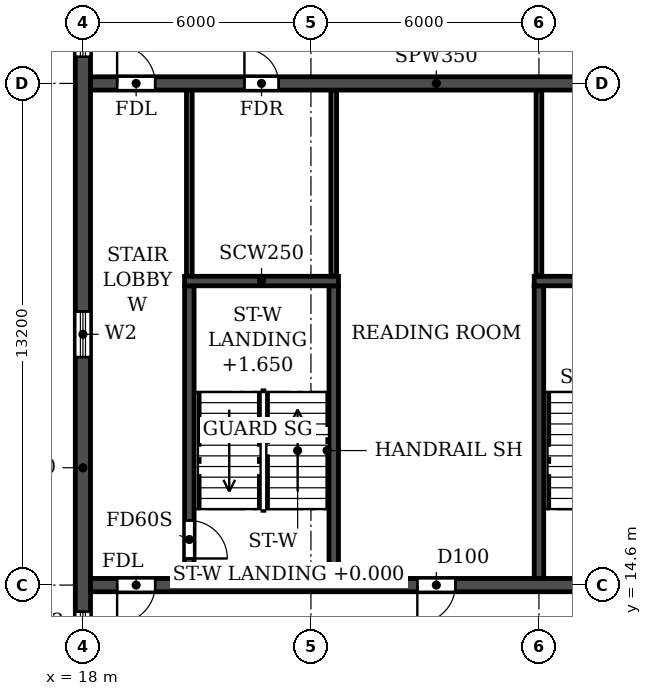
"""IFC4 building model, lengths in metres.
Left out: names, types, materials, properties, quantities, classifications, styles, units other than length and angle.
Written with IfcOpenShell. Run it as: python <this file> out.ifc"""

import sys

from ifc_helpers import new_model, si_unit, direction, frame, frame_2d, origin, place, context, subcontext, project, spatial, rectangle, extrude, element, fill, save


model = new_model("IFC4")
c1 = context("Model", 3, precision=1e-05, world=origin(), true_north=direction((0.0, 1.0)))
c2 = subcontext(c1, "Body", "Model", "MODEL_VIEW")
j1 = project(units=[si_unit("LENGTHUNIT", "METRE"), si_unit("PLANEANGLEUNIT", "RADIAN")], contexts=[c1])
p1 = place(None, origin())
s1 = spatial("IfcSite", under=j1, at=p1, CompositionType="ELEMENT")
p2 = place(p1, origin())
s2 = spatial("IfcBuilding", under=s1, at=p2, CompositionType="ELEMENT")
p3 = place(p2, frame((0.0, 0.0, 231.3)))
s3 = spatial("IfcBuildingStorey", under=s2, at=p3, CompositionType="ELEMENT", Elevation=231.3)
p4 = place(p3, frame((18.0, 4.683, 0.0), z_axis=(0.0, 0.0, 1.0), x_axis=(0.0, 1.0, 0.0)))
e1 = element("IfcWall", 1, at=p4, inside=s3, PredefinedType="SHEAR", context=c2, shape_type="SweptSolid", body=[
    extrude(rectangle(XDim=31.834, YDim=0.4, at=frame_2d((15.917, 0.0))), origin(), (0.0, 0.0, 1.0), 3.08),
])
p5 = place(p4, frame((23.817, 0.0, 0.9)))
e2 = element("IfcOpeningElement", 2, at=p5, cuts=e1, PredefinedType="OPENING", context=c2, shape_type="SweptSolid", body=[
    extrude(rectangle(XDim=1.2, YDim=1.5, at=frame_2d((0.6, 0.75))), frame((0.0, 0.21, 0.0), z_axis=(0.0, -1.0, 0.0), x_axis=(1.0, 0.0, 0.0)), (0.0, 0.0, 1.0), 0.42),
])
p6 = place(p4, frame((8.017, 0.0, 0.9)))
e3 = element("IfcOpeningElement", 3, at=p6, cuts=e1, PredefinedType="OPENING", context=c2, shape_type="SweptSolid", body=[
    extrude(rectangle(XDim=1.2, YDim=1.5, at=frame_2d((0.6, 0.75))), frame((0.0, 0.21, 0.0), z_axis=(0.0, -1.0, 0.0), x_axis=(1.0, 0.0, 0.0)), (0.0, 0.0, 1.0), 0.42),
])
p7 = place(p4, frame((27.694, 0.0, 0.6)))
e4 = element("IfcOpeningElement", 4, at=p7, cuts=e1, PredefinedType="OPENING", context=c2, shape_type="SweptSolid", body=[
    extrude(rectangle(XDim=2.2, YDim=1.8, at=frame_2d((1.1, 0.9))), frame((0.0, 0.21, 0.0), z_axis=(0.0, -1.0, 0.0), x_axis=(1.0, 0.0, 0.0)), (0.0, 0.0, 1.0), 0.42),
])
p8 = place(p4, frame((2.541, 0.0, 0.6)))
e5 = element("IfcOpeningElement", 5, at=p8, cuts=e1, PredefinedType="OPENING", context=c2, shape_type="SweptSolid", body=[
    extrude(rectangle(XDim=2.2, YDim=1.8, at=frame_2d((1.1, 0.9))), frame((0.0, 0.21, 0.0), z_axis=(0.0, -1.0, 0.0), x_axis=(1.0, 0.0, 0.0)), (0.0, 0.0, 1.0), 0.42),
])
p9 = place(p4, frame((15.917, 0.0, 0.9)))
e6 = element("IfcOpeningElement", 6, at=p9, cuts=e1, PredefinedType="OPENING", context=c2, shape_type="SweptSolid", body=[
    extrude(rectangle(XDim=1.2, YDim=1.5, at=frame_2d((0.6, 0.75))), frame((0.0, 0.21, 0.0), z_axis=(0.0, -1.0, 0.0), x_axis=(1.0, 0.0, 0.0)), (0.0, 0.0, 1.0), 0.42),
])
p10 = place(p3, frame((18.2, 14.6, 0.0), z_axis=(0.0, 0.0, 1.0), x_axis=(1.0, 0.0, 0.0)))
e7 = element("IfcWall", 7, at=p10, inside=s3, PredefinedType="SOLIDWALL", context=c2, shape_type="SweptSolid", body=[
    extrude(rectangle(XDim=65.6, YDim=0.35, at=frame_2d((32.8, 0.0))), origin(), (0.0, 0.0, 1.0), 3.08),
])
p11 = place(p10, frame((0.7, 0.0, 0.0)))
e8 = element("IfcOpeningElement", 8, at=p11, cuts=e7, PredefinedType="OPENING", context=c2, shape_type="SweptSolid", body=[
    extrude(rectangle(XDim=1.0, YDim=2.1, at=frame_2d((0.5, 1.05))), frame((0.0, 0.185, 0.0), z_axis=(0.0, -1.0, 0.0), x_axis=(1.0, 0.0, 0.0)), (0.0, 0.0, 1.0), 0.37),
])
p12 = place(p10, frame((8.6, 0.0, 0.0)))
e9 = element("IfcOpeningElement", 9, at=p12, cuts=e7, PredefinedType="OPENING", context=c2, shape_type="SweptSolid", body=[
    extrude(rectangle(XDim=1.0, YDim=2.1, at=frame_2d((0.5, 1.05))), frame((0.0, 0.185, 0.0), z_axis=(0.0, -1.0, 0.0), x_axis=(1.0, 0.0, 0.0)), (0.0, 0.0, 1.0), 0.37),
])
p13 = place(p10, frame((13.2, 0.0, 0.0)))
e10 = element("IfcOpeningElement", 10, at=p13, cuts=e7, PredefinedType="OPENING", context=c2, shape_type="SweptSolid", body=[
    extrude(rectangle(XDim=1.0, YDim=2.1, at=frame_2d((0.5, 1.05))), frame((0.0, 0.185, 0.0), z_axis=(0.0, -1.0, 0.0), x_axis=(1.0, 0.0, 0.0)), (0.0, 0.0, 1.0), 0.37),
])
p14 = place(p10, frame((24.5, 0.0, 0.0)))
e11 = element("IfcOpeningElement", 11, at=p14, cuts=e7, PredefinedType="OPENING", context=c2, shape_type="SweptSolid", body=[
    extrude(rectangle(XDim=1.0, YDim=2.1, at=frame_2d((0.5, 1.05))), frame((0.0, 0.185, 0.0), z_axis=(0.0, -1.0, 0.0), x_axis=(1.0, 0.0, 0.0)), (0.0, 0.0, 1.0), 0.37),
])
p15 = place(p10, frame((28.4, 0.0, 0.0)))
e12 = element("IfcOpeningElement", 12, at=p15, cuts=e7, PredefinedType="OPENING", context=c2, shape_type="SweptSolid", body=[
    extrude(rectangle(XDim=1.0, YDim=2.1, at=frame_2d((0.5, 1.05))), frame((0.0, 0.185, 0.0), z_axis=(0.0, -1.0, 0.0), x_axis=(1.0, 0.0, 0.0)), (0.0, 0.0, 1.0), 0.37),
])
p16 = place(p10, frame((32.3, 0.0, 0.0)))
e13 = element("IfcOpeningElement", 13, at=p16, cuts=e7, PredefinedType="OPENING", context=c2, shape_type="SweptSolid", body=[
    extrude(rectangle(XDim=1.0, YDim=2.1, at=frame_2d((0.5, 1.05))), frame((0.0, 0.185, 0.0), z_axis=(0.0, -1.0, 0.0), x_axis=(1.0, 0.0, 0.0)), (0.0, 0.0, 1.0), 0.37),
])
p17 = place(p10, frame((36.2, 0.0, 0.0)))
e14 = element("IfcOpeningElement", 14, at=p17, cuts=e7, PredefinedType="OPENING", context=c2, shape_type="SweptSolid", body=[
    extrude(rectangle(XDim=1.0, YDim=2.1, at=frame_2d((0.5, 1.05))), frame((0.0, 0.185, 0.0), z_axis=(0.0, -1.0, 0.0), x_axis=(1.0, 0.0, 0.0)), (0.0, 0.0, 1.0), 0.37),
])
p18 = place(p10, frame((40.1, 0.0, 0.0)))
e15 = element("IfcOpeningElement", 15, at=p18, cuts=e7, PredefinedType="OPENING", context=c2, shape_type="SweptSolid", body=[
    extrude(rectangle(XDim=1.0, YDim=2.1, at=frame_2d((0.5, 1.05))), frame((0.0, 0.185, 0.0), z_axis=(0.0, -1.0, 0.0), x_axis=(1.0, 0.0, 0.0)), (0.0, 0.0, 1.0), 0.37),
])
p19 = place(p10, frame((51.4, 0.0, 0.0)))
e16 = element("IfcOpeningElement", 16, at=p19, cuts=e7, PredefinedType="OPENING", context=c2, shape_type="SweptSolid", body=[
    extrude(rectangle(XDim=1.0, YDim=2.1, at=frame_2d((0.5, 1.05))), frame((0.0, 0.185, 0.0), z_axis=(0.0, -1.0, 0.0), x_axis=(1.0, 0.0, 0.0)), (0.0, 0.0, 1.0), 0.37),
])
p20 = place(p10, frame((56.0, 0.0, 0.0)))
e17 = element("IfcOpeningElement", 17, at=p20, cuts=e7, PredefinedType="OPENING", context=c2, shape_type="SweptSolid", body=[
    extrude(rectangle(XDim=1.0, YDim=2.1, at=frame_2d((0.5, 1.05))), frame((0.0, 0.185, 0.0), z_axis=(0.0, -1.0, 0.0), x_axis=(1.0, 0.0, 0.0)), (0.0, 0.0, 1.0), 0.37),
])
p21 = place(p10, frame((63.9, 0.0, 0.0)))
e18 = element("IfcOpeningElement", 18, at=p21, cuts=e7, PredefinedType="OPENING", context=c2, shape_type="SweptSolid", body=[
    extrude(rectangle(XDim=1.0, YDim=2.1, at=frame_2d((0.5, 1.05))), frame((0.0, 0.185, 0.0), z_axis=(0.0, -1.0, 0.0), x_axis=(1.0, 0.0, 0.0)), (0.0, 0.0, 1.0), 0.37),
])
p22 = place(p3, frame((18.2, 27.8, 0.0), z_axis=(0.0, 0.0, 1.0), x_axis=(1.0, 0.0, 0.0)))
e19 = element("IfcWall", 19, at=p22, inside=s3, PredefinedType="SOLIDWALL", context=c2, shape_type="SweptSolid", body=[
    extrude(rectangle(XDim=65.6, YDim=0.35, at=frame_2d((32.8, 0.0))), origin(), (0.0, 0.0, 1.0), 3.08),
])
p23 = place(p22, frame((0.7, 0.0, 0.0)))
e20 = element("IfcOpeningElement", 20, at=p23, cuts=e19, PredefinedType="OPENING", context=c2, shape_type="SweptSolid", body=[
    extrude(rectangle(XDim=1.0, YDim=2.1, at=frame_2d((0.5, 1.05))), frame((0.0, 0.185, 0.0), z_axis=(0.0, -1.0, 0.0), x_axis=(1.0, 0.0, 0.0)), (0.0, 0.0, 1.0), 0.37),
])
p24 = place(p22, frame((4.05, 0.0, 0.0)))
e21 = element("IfcOpeningElement", 21, at=p24, cuts=e19, PredefinedType="OPENING", context=c2, shape_type="SweptSolid", body=[
    extrude(rectangle(XDim=0.9, YDim=2.1, at=frame_2d((0.45, 1.05))), frame((0.0, 0.185, 0.0), z_axis=(0.0, -1.0, 0.0), x_axis=(1.0, 0.0, 0.0)), (0.0, 0.0, 1.0), 0.37),
])
p25 = place(p22, frame((13.25, 0.0, 0.0)))
e22 = element("IfcOpeningElement", 22, at=p25, cuts=e19, PredefinedType="OPENING", context=c2, shape_type="SweptSolid", body=[
    extrude(rectangle(XDim=0.9, YDim=2.1, at=frame_2d((0.45, 1.05))), frame((0.0, 0.185, 0.0), z_axis=(0.0, -1.0, 0.0), x_axis=(1.0, 0.0, 0.0)), (0.0, 0.0, 1.0), 0.37),
])
p26 = place(p22, frame((16.4, 0.0, 0.0)))
e23 = element("IfcOpeningElement", 23, at=p26, cuts=e19, PredefinedType="OPENING", context=c2, shape_type="SweptSolid", body=[
    extrude(rectangle(XDim=1.0, YDim=2.1, at=frame_2d((0.5, 1.05))), frame((0.0, 0.185, 0.0), z_axis=(0.0, -1.0, 0.0), x_axis=(1.0, 0.0, 0.0)), (0.0, 0.0, 1.0), 0.37),
])
p27 = place(p22, frame((21.6, 0.0, 0.0)))
e24 = element("IfcOpeningElement", 24, at=p27, cuts=e19, PredefinedType="OPENING", context=c2, shape_type="SweptSolid", body=[
    extrude(rectangle(XDim=1.0, YDim=2.1, at=frame_2d((0.5, 1.05))), frame((0.0, 0.185, 0.0), z_axis=(0.0, -1.0, 0.0), x_axis=(1.0, 0.0, 0.0)), (0.0, 0.0, 1.0), 0.37),
])
p28 = place(p22, frame((29.4, 0.0, 0.0)))
e25 = element("IfcOpeningElement", 25, at=p28, cuts=e19, PredefinedType="OPENING", context=c2, shape_type="SweptSolid", body=[
    extrude(rectangle(XDim=1.0, YDim=2.1, at=frame_2d((0.5, 1.05))), frame((0.0, 0.185, 0.0), z_axis=(0.0, -1.0, 0.0), x_axis=(1.0, 0.0, 0.0)), (0.0, 0.0, 1.0), 0.37),
])
p29 = place(p22, frame((32.3, 0.0, 0.0)))
e26 = element("IfcOpeningElement", 26, at=p29, cuts=e19, PredefinedType="OPENING", context=c2, shape_type="SweptSolid", body=[
    extrude(rectangle(XDim=1.0, YDim=2.1, at=frame_2d((0.5, 1.05))), frame((0.0, 0.185, 0.0), z_axis=(0.0, -1.0, 0.0), x_axis=(1.0, 0.0, 0.0)), (0.0, 0.0, 1.0), 0.37),
])
p30 = place(p22, frame((35.2, 0.0, 0.0)))
e27 = element("IfcOpeningElement", 27, at=p30, cuts=e19, PredefinedType="OPENING", context=c2, shape_type="SweptSolid", body=[
    extrude(rectangle(XDim=1.0, YDim=2.1, at=frame_2d((0.5, 1.05))), frame((0.0, 0.185, 0.0), z_axis=(0.0, -1.0, 0.0), x_axis=(1.0, 0.0, 0.0)), (0.0, 0.0, 1.0), 0.37),
])
p31 = place(p22, frame((37.8, 0.0, 0.0)))
e28 = element("IfcOpeningElement", 28, at=p31, cuts=e19, PredefinedType="OPENING", context=c2, shape_type="SweptSolid", body=[
    extrude(rectangle(XDim=1.0, YDim=2.1, at=frame_2d((0.5, 1.05))), frame((0.0, 0.185, 0.0), z_axis=(0.0, -1.0, 0.0), x_axis=(1.0, 0.0, 0.0)), (0.0, 0.0, 1.0), 0.37),
])
p32 = place(p22, frame((40.4, 0.0, 0.0)))
e29 = element("IfcOpeningElement", 29, at=p32, cuts=e19, PredefinedType="OPENING", context=c2, shape_type="SweptSolid", body=[
    extrude(rectangle(XDim=1.0, YDim=2.1, at=frame_2d((0.5, 1.05))), frame((0.0, 0.185, 0.0), z_axis=(0.0, -1.0, 0.0), x_axis=(1.0, 0.0, 0.0)), (0.0, 0.0, 1.0), 0.37),
])
p33 = place(p22, frame((43.0, 0.0, 0.0)))
e30 = element("IfcOpeningElement", 30, at=p33, cuts=e19, PredefinedType="OPENING", context=c2, shape_type="SweptSolid", body=[
    extrude(rectangle(XDim=1.0, YDim=2.1, at=frame_2d((0.5, 1.05))), frame((0.0, 0.185, 0.0), z_axis=(0.0, -1.0, 0.0), x_axis=(1.0, 0.0, 0.0)), (0.0, 0.0, 1.0), 0.37),
])
p34 = place(p22, frame((45.6, 0.0, 0.0)))
e31 = element("IfcOpeningElement", 31, at=p34, cuts=e19, PredefinedType="OPENING", context=c2, shape_type="SweptSolid", body=[
    extrude(rectangle(XDim=1.0, YDim=2.1, at=frame_2d((0.5, 1.05))), frame((0.0, 0.185, 0.0), z_axis=(0.0, -1.0, 0.0), x_axis=(1.0, 0.0, 0.0)), (0.0, 0.0, 1.0), 0.37),
])
p35 = place(p22, frame((48.2, 0.0, 0.0)))
e32 = element("IfcOpeningElement", 32, at=p35, cuts=e19, PredefinedType="OPENING", context=c2, shape_type="SweptSolid", body=[
    extrude(rectangle(XDim=1.0, YDim=2.1, at=frame_2d((0.5, 1.05))), frame((0.0, 0.185, 0.0), z_axis=(0.0, -1.0, 0.0), x_axis=(1.0, 0.0, 0.0)), (0.0, 0.0, 1.0), 0.37),
])
p36 = place(p22, frame((51.45, 0.0, 0.0)))
e33 = element("IfcOpeningElement", 33, at=p36, cuts=e19, PredefinedType="OPENING", context=c2, shape_type="SweptSolid", body=[
    extrude(rectangle(XDim=0.9, YDim=2.1, at=frame_2d((0.45, 1.05))), frame((0.0, 0.185, 0.0), z_axis=(0.0, -1.0, 0.0), x_axis=(1.0, 0.0, 0.0)), (0.0, 0.0, 1.0), 0.37),
])
p37 = place(p22, frame((60.65, 0.0, 0.0)))
e34 = element("IfcOpeningElement", 34, at=p37, cuts=e19, PredefinedType="OPENING", context=c2, shape_type="SweptSolid", body=[
    extrude(rectangle(XDim=0.9, YDim=2.1, at=frame_2d((0.45, 1.05))), frame((0.0, 0.185, 0.0), z_axis=(0.0, -1.0, 0.0), x_axis=(1.0, 0.0, 0.0)), (0.0, 0.0, 1.0), 0.37),
])
p38 = place(p22, frame((63.9, 0.0, 0.0)))
e35 = element("IfcOpeningElement", 35, at=p38, cuts=e19, PredefinedType="OPENING", context=c2, shape_type="SweptSolid", body=[
    extrude(rectangle(XDim=1.0, YDim=2.1, at=frame_2d((0.5, 1.05))), frame((0.0, 0.185, 0.0), z_axis=(0.0, -1.0, 0.0), x_axis=(1.0, 0.0, 0.0)), (0.0, 0.0, 1.0), 0.37),
])
p39 = place(p3, frame((30.0, 14.775, 0.0), z_axis=(0.0, 0.0, 1.0), x_axis=(0.0, 1.0, 0.0)))
e36 = element("IfcWall", 36, at=p39, inside=s3, PredefinedType="SOLIDWALL", context=c2, shape_type="SweptSolid", body=[
    extrude(rectangle(XDim=7.7, YDim=0.25, at=frame_2d((3.85, 0.0))), origin(), (0.0, 0.0, 1.0), 3.08),
])
p40 = place(p3, frame((29.875, 22.6, 0.0), z_axis=(0.0, 0.0, 1.0), x_axis=(1.0, 0.0, 0.0)))
e37 = element("IfcWall", 37, at=p40, inside=s3, PredefinedType="SOLIDWALL", context=c2, shape_type="SweptSolid", body=[
    extrude(rectangle(XDim=4.05, YDim=0.25, at=frame_2d((2.025, 0.0))), origin(), (0.0, 0.0, 1.0), 3.08),
])
p41 = place(p3, frame((20.8, 14.775, 0.0), z_axis=(0.0, 0.0, 1.0), x_axis=(0.0, 1.0, 0.0)))
e38 = element("IfcWall", 38, at=p41, inside=s3, PredefinedType="SOLIDWALL", context=c2, shape_type="SweptSolid", body=[
    extrude(rectangle(XDim=7.7, YDim=0.25, at=frame_2d((3.85, 0.0))), origin(), (0.0, 0.0, 1.0), 3.08),
])
p42 = place(p41, frame((0.525, 0.0, 0.0)))
e39 = element("IfcOpeningElement", 39, at=p42, cuts=e38, PredefinedType="OPENING", context=c2, shape_type="SweptSolid", body=[
    extrude(rectangle(XDim=1.0, YDim=2.1, at=frame_2d((0.5, 1.05))), frame((0.0, 0.135, 0.0), z_axis=(0.0, -1.0, 0.0), x_axis=(1.0, 0.0, 0.0)), (0.0, 0.0, 1.0), 0.27),
])
p43 = place(p3, frame((24.6, 14.775, 0.0), z_axis=(0.0, 0.0, 1.0), x_axis=(0.0, 1.0, 0.0)))
e40 = element("IfcWall", 40, at=p43, inside=s3, PredefinedType="SOLIDWALL", context=c2, shape_type="SweptSolid", body=[
    extrude(rectangle(XDim=7.7, YDim=0.25, at=frame_2d((3.85, 0.0))), origin(), (0.0, 0.0, 1.0), 3.08),
])
p44 = place(p3, frame((20.675, 22.6, 0.0), z_axis=(0.0, 0.0, 1.0), x_axis=(1.0, 0.0, 0.0)))
e41 = element("IfcWall", 41, at=p44, inside=s3, PredefinedType="SOLIDWALL", context=c2, shape_type="SweptSolid", body=[
    extrude(rectangle(XDim=4.05, YDim=0.25, at=frame_2d((2.025, 0.0))), origin(), (0.0, 0.0, 1.0), 3.08),
])
for number, where, z_axis, x_axis in (
    (42, (20.8, 22.735, 0.0), (0.0, 0.0, 1.0), (0.0, 1.0, 0.0)),
    (43, (24.6, 22.735, 0.0), (0.0, 0.0, 1.0), (0.0, 1.0, 0.0)),
    (44, (30.0, 22.735, 0.0), (0.0, 0.0, 1.0), (0.0, 1.0, 0.0)),
):
    element("IfcWall", number, at=place(p3, frame(where, z_axis=z_axis, x_axis=x_axis)), inside=s3, PredefinedType="PARTITIONING", context=c2, shape_type="SweptSolid", body=[
        extrude(rectangle(XDim=4.88, YDim=0.15, at=frame_2d((2.44, 0.0))), origin(), (0.0, 0.0, 1.0), 3.08),
    ])
p45 = place(p5, origin())
e45 = element("IfcWindow", 45, at=p45, inside=s3, PartitioningType="SINGLE_PANEL", PredefinedType="WINDOW", context=c2, shape_type="SweptSolid", body=[
    extrude(rectangle(XDim=1.2, YDim=1.5, at=frame_2d((0.6, 0.75))), frame((0.0, 0.03, 0.0), z_axis=(0.0, -1.0, 0.0), x_axis=(1.0, 0.0, 0.0)), (0.0, 0.0, 1.0), 0.06),
])
fill(e2, e45)
p46 = place(p6, origin())
e46 = element("IfcWindow", 46, at=p46, inside=s3, PartitioningType="SINGLE_PANEL", PredefinedType="WINDOW", context=c2, shape_type="SweptSolid", body=[
    extrude(rectangle(XDim=1.2, YDim=1.5, at=frame_2d((0.6, 0.75))), frame((0.0, 0.03, 0.0), z_axis=(0.0, -1.0, 0.0), x_axis=(1.0, 0.0, 0.0)), (0.0, 0.0, 1.0), 0.06),
])
fill(e3, e46)
p47 = place(p9, origin())
e47 = element("IfcWindow", 47, at=p47, inside=s3, PartitioningType="SINGLE_PANEL", PredefinedType="WINDOW", context=c2, shape_type="SweptSolid", body=[
    extrude(rectangle(XDim=1.2, YDim=1.5, at=frame_2d((0.6, 0.75))), frame((0.0, 0.03, 0.0), z_axis=(0.0, -1.0, 0.0), x_axis=(1.0, 0.0, 0.0)), (0.0, 0.0, 1.0), 0.06),
])
fill(e6, e47)
p48 = place(p23, origin())
e48 = element("IfcDoor", 48, at=p48, inside=s3, OperationType="SINGLE_SWING_LEFT", PredefinedType="DOOR", context=c2, shape_type="SweptSolid", body=[
    extrude(rectangle(XDim=1.0, YDim=2.1, at=frame_2d((0.5, 1.05))), frame((0.0, 0.025, 0.0), z_axis=(0.0, -1.0, 0.0), x_axis=(1.0, 0.0, 0.0)), (0.0, 0.0, 1.0), 0.05),
])
fill(e20, e48)
p49 = place(p24, origin())
e49 = element("IfcDoor", 49, at=p49, inside=s3, OperationType="SINGLE_SWING_LEFT", PredefinedType="DOOR", context=c2, shape_type="SweptSolid", body=[
    extrude(rectangle(XDim=0.9, YDim=2.1, at=frame_2d((0.45, 1.05))), frame((0.0, 0.025, 0.0), z_axis=(0.0, -1.0, 0.0), x_axis=(1.0, 0.0, 0.0)), (0.0, 0.0, 1.0), 0.05),
])
fill(e21, e49)
p50 = place(p11, frame((1.0, 0.0, 0.0), z_axis=(0.0, 0.0, 1.0), x_axis=(-1.0, 0.0, 0.0)))
e50 = element("IfcDoor", 50, at=p50, inside=s3, OperationType="SINGLE_SWING_RIGHT", PredefinedType="DOOR", context=c2, shape_type="SweptSolid", body=[
    extrude(rectangle(XDim=1.0, YDim=2.1, at=frame_2d((0.5, 1.05))), frame((0.0, 0.025, 0.0), z_axis=(0.0, -1.0, 0.0), x_axis=(1.0, 0.0, 0.0)), (0.0, 0.0, 1.0), 0.05),
])
fill(e8, e50)
p51 = place(p12, frame((1.0, 0.0, 0.0), z_axis=(0.0, 0.0, 1.0), x_axis=(-1.0, 0.0, 0.0)))
e51 = element("IfcDoor", 51, at=p51, inside=s3, OperationType="SINGLE_SWING_RIGHT", PredefinedType="DOOR", context=c2, shape_type="SweptSolid", body=[
    extrude(rectangle(XDim=1.0, YDim=2.1, at=frame_2d((0.5, 1.05))), frame((0.0, 0.025, 0.0), z_axis=(0.0, -1.0, 0.0), x_axis=(1.0, 0.0, 0.0)), (0.0, 0.0, 1.0), 0.05),
])
fill(e9, e51)
p52 = place(p42, frame((1.0, 0.0, 0.0), z_axis=(0.0, 0.0, 1.0), x_axis=(-1.0, 0.0, 0.0)))
e52 = element("IfcDoor", 52, at=p52, inside=s3, OperationType="SINGLE_SWING_RIGHT", PredefinedType="DOOR", context=c2, shape_type="SweptSolid", body=[
    extrude(rectangle(XDim=1.0, YDim=2.1, at=frame_2d((0.5, 1.05))), frame((0.0, 0.025, 0.0), z_axis=(0.0, -1.0, 0.0), x_axis=(1.0, 0.0, 0.0)), (0.0, 0.0, 1.0), 0.05),
])
fill(e39, e52)
save(model, sys.argv[1])
